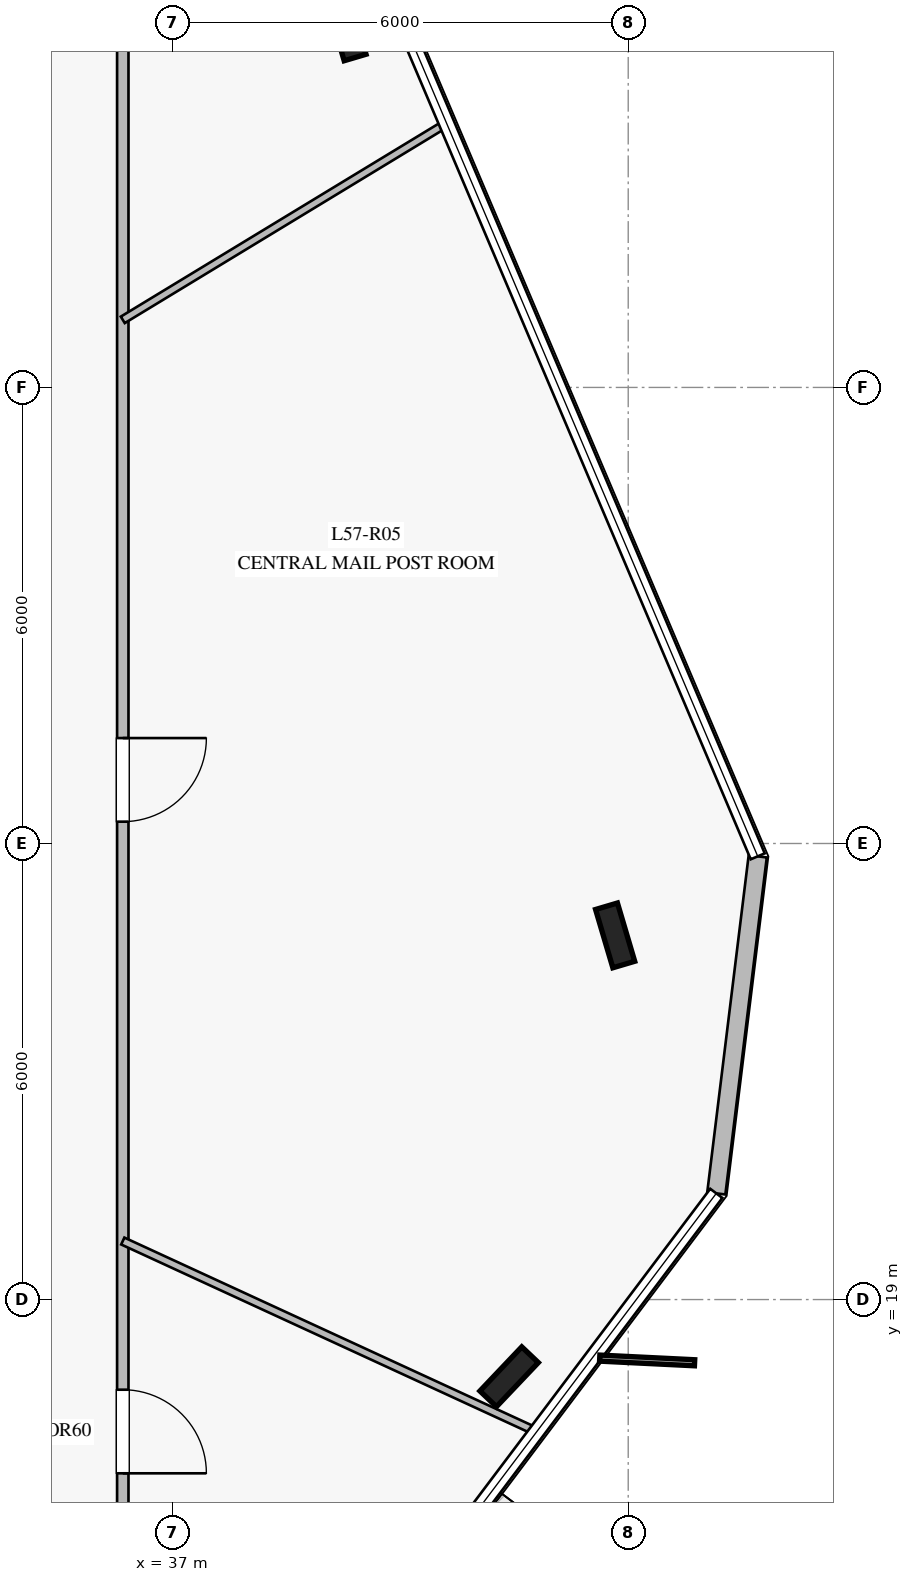
"""IFC4 building model, lengths in metres.
Left out: names, types, materials, properties, quantities, classifications, styles, units other than length and angle.
Written with IfcOpenShell. Run it as: python <this file> out.ifc"""

import sys

from ifc_helpers import new_model, si_unit, direction, frame, frame_2d, origin, origin_2d, place, context, subcontext, project, spatial, rectangle, i_section, extrude, element, fill, save


model = new_model("IFC4")
c1 = context("Model", 3, precision=1e-05, world=origin(), true_north=direction((0.0, 1.0)))
c2 = subcontext(c1, "Body", "Model", "MODEL_VIEW")
j1 = project(units=[si_unit("LENGTHUNIT", "METRE"), si_unit("PLANEANGLEUNIT", "RADIAN")], contexts=[c1])
p1 = place(None, origin())
s1 = spatial("IfcSite", under=j1, at=p1, CompositionType="ELEMENT")
p2 = place(p1, origin())
s2 = spatial("IfcBuilding", under=s1, at=p2, CompositionType="ELEMENT")
p3 = place(p2, frame((0.0, 0.0, 236.8)))
s3 = spatial("IfcBuildingStorey", under=s2, at=p3, CompositionType="ELEMENT", Elevation=236.8)
for number, where, z_axis, x_axis in (
    (1, (41.433, 17.984, 0.0), (0.0, 0.0, 1.0), (0.688, 0.725, 0.0)),
    (2, (42.828, 23.791, 0.0), (0.0, 0.0, 1.0), (-0.284, 0.959, 0.0)),
):
    element("IfcColumn", number, at=place(p3, frame(where, z_axis=z_axis, x_axis=x_axis)), inside=s3, PredefinedType="COLUMN", context=c2, shape_type="SweptSolid", body=[
        extrude(i_section(OverallWidth=0.3, OverallDepth=0.8, WebThickness=0.018, FlangeThickness=0.033, at=origin_2d()), origin(), (0.0, 0.0, 1.0), 4.0),
    ])
p4 = place(p3, frame((44.159, 20.397, 0.0), z_axis=(0.0, 0.0, 1.0), x_axis=(0.122030142036, 0.99252639483, 0.0)))
e3 = element("IfcWall", 3, at=p4, inside=s3, PredefinedType="STANDARD", context=c2, shape_type="SweptSolid", body=[
    extrude(rectangle(XDim=4.468, YDim=0.24, at=frame_2d((2.234, 0.0))), origin(), (0.0, 0.0, 1.0), 3.78),
])
p5 = place(p3, frame((36.35, 35.75, 0.0), z_axis=(0.0, 0.0, 1.0), x_axis=(0.0, -1.0, 0.0)))
e4 = element("IfcWall", 4, at=p5, inside=s3, PredefinedType="PARTITIONING", context=c2, shape_type="SweptSolid", body=[
    extrude(rectangle(XDim=21.5, YDim=0.15, at=frame_2d((10.75, 0.0))), origin(), (0.0, 0.0, 1.0), 3.02),
])
p6 = place(p5, frame((17.936, 0.0, 0.0)))
e5 = element("IfcOpeningElement", 5, at=p6, cuts=e4, PredefinedType="OPENING", context=c2, shape_type="SweptSolid", body=[
    extrude(rectangle(XDim=1.1, YDim=2.2, at=frame_2d((0.55, 1.1))), frame((0.0, 0.085, 0.0), z_axis=(0.0, -1.0, 0.0), x_axis=(1.0, 0.0, 0.0)), (0.0, 0.0, 1.0), 0.17),
])
p7 = place(p5, frame((9.363, 0.0, 0.0)))
e6 = element("IfcOpeningElement", 6, at=p7, cuts=e4, PredefinedType="OPENING", context=c2, shape_type="SweptSolid", body=[
    extrude(rectangle(XDim=1.1, YDim=2.2, at=frame_2d((0.55, 1.1))), frame((0.0, 0.085, 0.0), z_axis=(0.0, -1.0, 0.0), x_axis=(1.0, 0.0, 0.0)), (0.0, 0.0, 1.0), 0.17),
])
p8 = place(p3, frame((36.35, 19.77, 0.0), z_axis=(0.0, 0.0, 1.0), x_axis=(0.90822453429, -0.418483207923, 0.0)))
e7 = element("IfcWall", 7, at=p8, inside=s3, PredefinedType="MOVABLE", context=c2, shape_type="SweptSolid", body=[
    extrude(rectangle(XDim=5.979, YDim=0.1, at=frame_2d((2.989, 0.0))), origin(), (0.0, 0.0, 1.0), 3.18),
])
p9 = place(p3, frame((36.35, 31.889, 0.0), z_axis=(0.0, 0.0, 1.0), x_axis=(0.854761817099, 0.5190204582, 0.0)))
e8 = element("IfcWall", 8, at=p9, inside=s3, PredefinedType="MOVABLE", context=c2, shape_type="SweptSolid", body=[
    extrude(rectangle(XDim=4.967, YDim=0.1, at=frame_2d((2.484, 0.0))), origin(), (0.0, 0.0, 1.0), 3.18),
])
p10 = place(p6, origin())
e9 = element("IfcDoor", 9, at=p10, inside=s3, OperationType="SINGLE_SWING_RIGHT", PredefinedType="DOOR", context=c2, shape_type="SweptSolid", body=[
    extrude(rectangle(XDim=1.1, YDim=2.2, at=frame_2d((0.55, 1.1))), frame((0.0, 0.025, 0.0), z_axis=(0.0, -1.0, 0.0), x_axis=(1.0, 0.0, 0.0)), (0.0, 0.0, 1.0), 0.05),
])
fill(e5, e9)
p11 = place(p7, origin())
e10 = element("IfcDoor", 10, at=p11, inside=s3, OperationType="SINGLE_SWING_LEFT", PredefinedType="DOOR", context=c2, shape_type="SweptSolid", body=[
    extrude(rectangle(XDim=1.1, YDim=2.2, at=frame_2d((0.55, 1.1))), frame((0.0, 0.025, 0.0), z_axis=(0.0, -1.0, 0.0), x_axis=(1.0, 0.0, 0.0)), (0.0, 0.0, 1.0), 0.05),
])
fill(e6, e10)
save(model, sys.argv[1])
